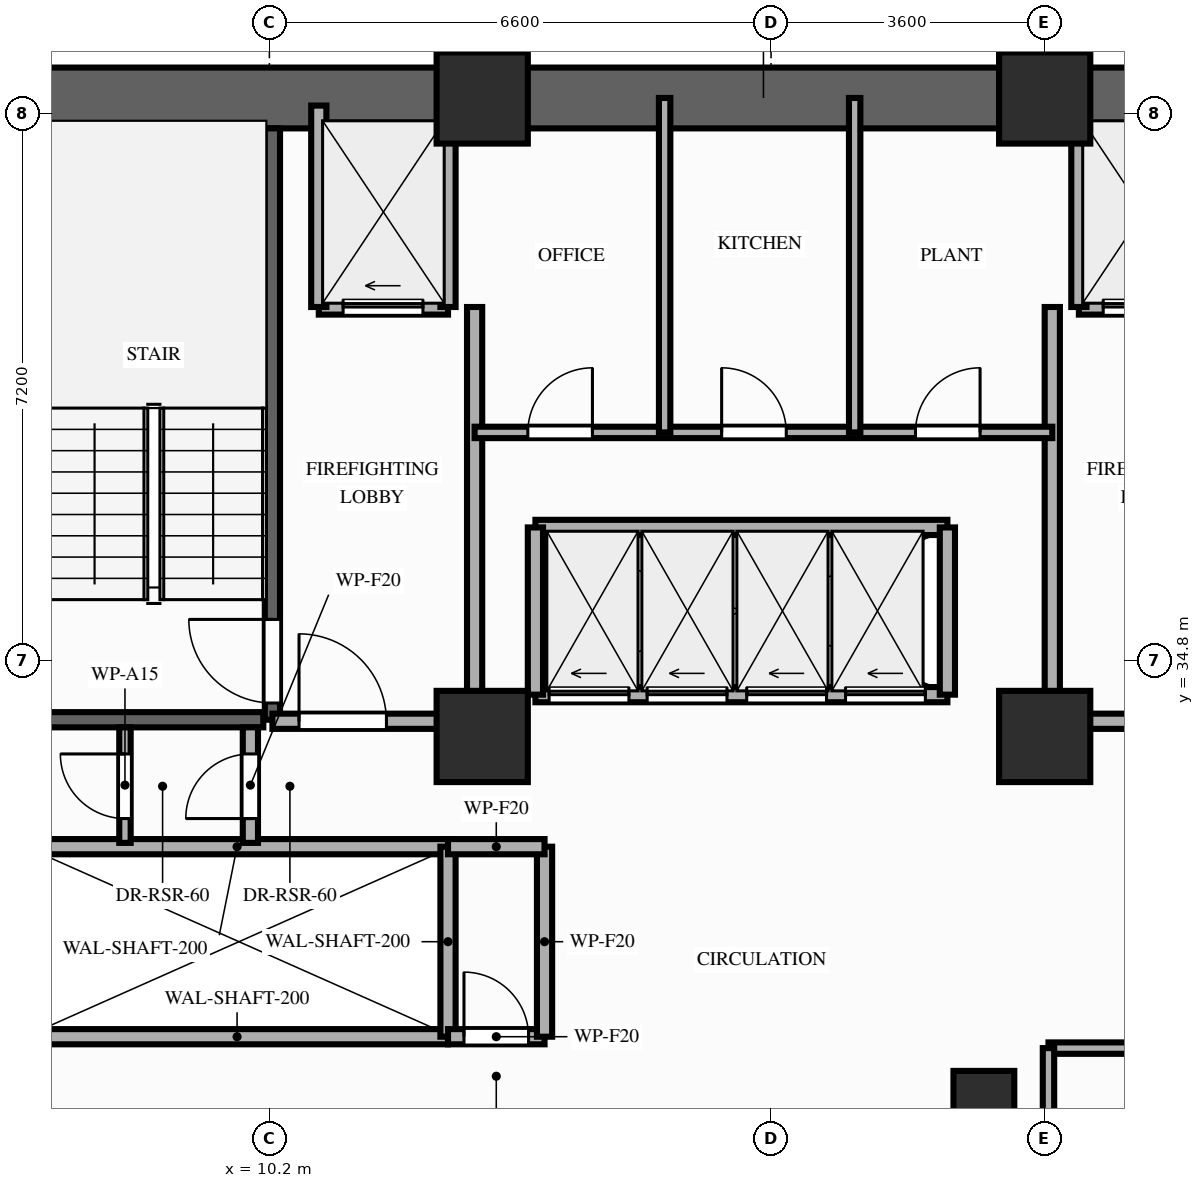
"""IFC4 building model, lengths in metres.
Left out: names, types, materials, properties, quantities, classifications, styles, units other than length and angle.
Written with IfcOpenShell. Run it as: python <this file> out.ifc"""

import sys

from ifc_helpers import new_model, si_unit, direction, frame, frame_2d, origin, origin_2d, place, context, subcontext, project, spatial, rectangle, extrude, element, fill, save


model = new_model("IFC4")
c1 = context("Model", 3, precision=1e-05, world=origin(), true_north=direction((0.0, 1.0)))
c2 = subcontext(c1, "Body", "Model", "MODEL_VIEW")
j1 = project(units=[si_unit("LENGTHUNIT", "METRE"), si_unit("PLANEANGLEUNIT", "RADIAN")], contexts=[c1])
p1 = place(None, origin())
s1 = spatial("IfcSite", under=j1, at=p1, CompositionType="ELEMENT")
p2 = place(p1, origin())
s2 = spatial("IfcBuilding", under=s1, at=p2, CompositionType="ELEMENT")
p3 = place(p2, frame((0.0, 0.0, 93.0)))
s3 = spatial("IfcBuildingStorey", under=s2, at=p3, CompositionType="ELEMENT", Elevation=93.0)
for number, where, z_axis, x_axis in (
    (1, (13.0, 33.8, 0.0), (0.0, 0.0, 1.0), (1.0, 0.0, 0.0)),
    (2, (20.4, 33.8, 0.0), (0.0, 0.0, 1.0), (1.0, 0.0, 0.0)),
    (3, (13.0, 42.2, 0.0), (0.0, 0.0, 1.0), (1.0, 0.0, 0.0)),
    (4, (20.4, 42.2, 0.0), (0.0, 0.0, 1.0), (1.0, 0.0, 0.0)),
):
    element("IfcColumn", number, at=place(p3, frame(where, z_axis=z_axis, x_axis=x_axis)), inside=s3, PredefinedType="COLUMN", context=c2, shape_type="SweptSolid", body=[
        extrude(rectangle(XDim=1.2, YDim=1.2, at=origin_2d()), origin(), (0.0, 0.0, 1.0), 3.2),
    ])
p4 = place(p3, frame((19.6, 28.8, 0.0), z_axis=(0.0, 0.0, 1.0), x_axis=(1.0, 0.0, 0.0)))
e5 = element("IfcColumn", 5, at=p4, inside=s3, PredefinedType="COLUMN", context=c2, shape_type="SweptSolid", body=[
    extrude(rectangle(XDim=0.8, YDim=1.2, at=origin_2d()), origin(), (0.0, 0.0, 1.0), 3.2),
])
p5 = place(p3, frame((6.45, 42.2, 0.0), z_axis=(0.0, 0.0, 1.0), x_axis=(1.0, 0.0, 0.0)))
e6 = element("IfcWall", 6, at=p5, inside=s3, PredefinedType="SHEAR", context=c2, shape_type="SweptSolid", body=[
    extrude(rectangle(XDim=20.45, YDim=0.8, at=frame_2d((10.225, 0.0))), origin(), (0.0, 0.0, 1.0), 3.02),
])
p6 = place(p3, frame((10.24, 34.02, 0.0), z_axis=(0.0, 0.0, 1.0), x_axis=(0.0, 1.0, 0.0)))
e7 = element("IfcWall", 7, at=p6, inside=s3, PredefinedType="SHEAR", context=c2, shape_type="SweptSolid", body=[
    extrude(rectangle(XDim=7.78, YDim=0.2, at=frame_2d((3.89, 0.0))), origin(), (0.0, 0.0, 1.0), 3.02),
])
p7 = place(p6, frame((0.22, 0.0, 0.0)))
e8 = element("IfcOpeningElement", 8, at=p7, cuts=e7, PredefinedType="OPENING", context=c2, shape_type="SweptSolid", body=[
    extrude(rectangle(XDim=1.1, YDim=2.15, at=frame_2d((0.55, 1.075))), frame((0.0, 0.11, 0.0), z_axis=(0.0, -1.0, 0.0), x_axis=(1.0, 0.0, 0.0)), (0.0, 0.0, 1.0), 0.22),
])
p8 = place(p3, frame((7.24, 34.02, 0.0), z_axis=(0.0, 0.0, 1.0), x_axis=(1.0, 0.0, 0.0)))
e9 = element("IfcWall", 9, at=p8, inside=s3, PredefinedType="SHEAR", context=c2, shape_type="SweptSolid", body=[
    extrude(rectangle(XDim=2.88, YDim=0.2, at=frame_2d((1.44, 0.0))), origin(), (0.0, 0.0, 1.0), 3.02),
])
for number, where, z_axis, x_axis in (
    (10, (7.0, 29.85, 0.0), (0.0, 0.0, 1.0), (1.0, 0.0, 0.0)),
    (11, (7.0, 32.35, 0.0), (0.0, 0.0, 1.0), (1.0, 0.0, 0.0)),
):
    element("IfcWall", number, at=place(p3, frame(where, z_axis=z_axis, x_axis=x_axis)), inside=s3, PredefinedType="MOVABLE", context=c2, shape_type="SweptSolid", body=[
        extrude(rectangle(XDim=5.55, YDim=0.2, at=frame_2d((2.775, 0.0))), origin(), (0.0, 0.0, 1.0), 3.02),
    ])
p9 = place(p3, frame((12.55, 29.85, 0.0), z_axis=(0.0, 0.0, 1.0), x_axis=(0.0, 1.0, 0.0)))
e12 = element("IfcWall", 12, at=p9, inside=s3, PredefinedType="MOVABLE", context=c2, shape_type="SweptSolid", body=[
    extrude(rectangle(XDim=2.5, YDim=0.2, at=frame_2d((1.25, 0.0))), origin(), (0.0, 0.0, 1.0), 3.02),
])
p10 = place(p3, frame((10.85, 39.45, 0.0), z_axis=(0.0, 0.0, 1.0), x_axis=(1.0, 0.0, 0.0)))
e13 = element("IfcWall", 13, at=p10, inside=s3, PredefinedType="MOVABLE", context=c2, shape_type="SweptSolid", body=[
    extrude(rectangle(XDim=1.7, YDim=0.2, at=frame_2d((0.85, 0.0))), origin(), (0.0, 0.0, 1.0), 3.02),
])
p11 = place(p10, frame((0.32, 0.0, 0.0)))
e14 = element("IfcOpeningElement", 14, at=p11, cuts=e13, PredefinedType="OPENING", context=c2, shape_type="SweptSolid", body=[
    extrude(rectangle(XDim=1.05, YDim=2.15, at=frame_2d((0.525, 1.075))), frame((0.0, 0.11, 0.0), z_axis=(0.0, -1.0, 0.0), x_axis=(1.0, 0.0, 0.0)), (0.0, 0.0, 1.0), 0.22),
])
p12 = place(p3, frame((20.85, 39.45, 0.0), z_axis=(0.0, 0.0, 1.0), x_axis=(1.0, 0.0, 0.0)))
e15 = element("IfcWall", 15, at=p12, inside=s3, PredefinedType="MOVABLE", context=c2, shape_type="SweptSolid", body=[
    extrude(rectangle(XDim=1.7, YDim=0.2, at=frame_2d((0.85, 0.0))), origin(), (0.0, 0.0, 1.0), 3.02),
])
p13 = place(p12, frame((0.32, 0.0, 0.0)))
e16 = element("IfcOpeningElement", 16, at=p13, cuts=e15, PredefinedType="OPENING", context=c2, shape_type="SweptSolid", body=[
    extrude(rectangle(XDim=1.05, YDim=2.15, at=frame_2d((0.525, 1.075))), frame((0.0, 0.11, 0.0), z_axis=(0.0, -1.0, 0.0), x_axis=(1.0, 0.0, 0.0)), (0.0, 0.0, 1.0), 0.22),
])
for number, where, z_axis, x_axis in (
    (17, (10.85, 39.45, 0.0), (0.0, 0.0, 1.0), (0.0, 1.0, 0.0)),
    (18, (12.55, 39.45, 0.0), (0.0, 0.0, 1.0), (0.0, 1.0, 0.0)),
):
    element("IfcWall", number, at=place(p3, frame(where, z_axis=z_axis, x_axis=x_axis)), inside=s3, PredefinedType="MOVABLE", context=c2, shape_type="SweptSolid", body=[
        extrude(rectangle(XDim=2.65, YDim=0.2, at=frame_2d((1.325, 0.0))), origin(), (0.0, 0.0, 1.0), 2.41),
    ])
p14 = place(p3, frame((12.9, 34.0, 0.0), z_axis=(0.0, 0.0, 1.0), x_axis=(0.0, 1.0, 0.0)))
e19 = element("IfcWall", 19, at=p14, inside=s3, PredefinedType="PARTITIONING", context=c2, shape_type="SweptSolid", body=[
    extrude(rectangle(XDim=5.45, YDim=0.2, at=frame_2d((2.725, 0.0))), origin(), (0.0, 0.0, 1.0), 2.41),
])
p15 = place(p3, frame((10.24, 34.0, 0.0), z_axis=(0.0, 0.0, 1.0), x_axis=(1.0, 0.0, 0.0)))
e20 = element("IfcWall", 20, at=p15, inside=s3, PredefinedType="PARTITIONING", context=c2, shape_type="SweptSolid", body=[
    extrude(rectangle(XDim=2.66, YDim=0.2, at=frame_2d((1.33, 0.0))), origin(), (0.0, 0.0, 1.0), 2.41),
])
p16 = place(p15, frame((0.35, 0.0, 0.0)))
e21 = element("IfcOpeningElement", 21, at=p16, cuts=e20, PredefinedType="OPENING", context=c2, shape_type="SweptSolid", body=[
    extrude(rectangle(XDim=1.15, YDim=2.15, at=frame_2d((0.575, 1.075))), frame((0.0, 0.11, 0.0), z_axis=(0.0, -1.0, 0.0), x_axis=(1.0, 0.0, 0.0)), (0.0, 0.0, 1.0), 0.22),
])
p17 = place(p3, frame((20.85, 39.45, 0.0), z_axis=(0.0, 0.0, 1.0), x_axis=(0.0, 1.0, 0.0)))
e22 = element("IfcWall", 22, at=p17, inside=s3, PredefinedType="MOVABLE", context=c2, shape_type="SweptSolid", body=[
    extrude(rectangle(XDim=2.65, YDim=0.2, at=frame_2d((1.325, 0.0))), origin(), (0.0, 0.0, 1.0), 2.41),
])
p18 = place(p3, frame((20.5, 34.0, 0.0), z_axis=(0.0, 0.0, 1.0), x_axis=(0.0, 1.0, 0.0)))
e23 = element("IfcWall", 23, at=p18, inside=s3, PredefinedType="PARTITIONING", context=c2, shape_type="SweptSolid", body=[
    extrude(rectangle(XDim=5.45, YDim=0.2, at=frame_2d((2.725, 0.0))), origin(), (0.0, 0.0, 1.0), 2.41),
])
p19 = place(p3, frame((20.5, 34.0, 0.0), z_axis=(0.0, 0.0, 1.0), x_axis=(1.0, 0.0, 0.0)))
e24 = element("IfcWall", 24, at=p19, inside=s3, PredefinedType="PARTITIONING", context=c2, shape_type="SweptSolid", body=[
    extrude(rectangle(XDim=2.6, YDim=0.2, at=frame_2d((1.3, 0.0))), origin(), (0.0, 0.0, 1.0), 2.41),
])
p20 = place(p19, frame((1.05, 0.0, 0.0)))
e25 = element("IfcOpeningElement", 25, at=p20, cuts=e24, PredefinedType="OPENING", context=c2, shape_type="SweptSolid", body=[
    extrude(rectangle(XDim=1.15, YDim=2.15, at=frame_2d((0.575, 1.075))), frame((0.0, 0.11, 0.0), z_axis=(0.0, -1.0, 0.0), x_axis=(1.0, 0.0, 0.0)), (0.0, 0.0, 1.0), 0.22),
])
p21 = place(p3, frame((9.95, 32.4, 0.0), z_axis=(0.0, 0.0, 1.0), x_axis=(0.0, 1.0, 0.0)))
e26 = element("IfcWall", 26, at=p21, inside=s3, PredefinedType="PARTITIONING", context=c2, shape_type="SweptSolid", body=[
    extrude(rectangle(XDim=1.52, YDim=0.2, at=frame_2d((0.76, 0.0))), origin(), (0.0, 0.0, 1.0), 2.41),
])
p22 = place(p21, frame((0.32, 0.0, 0.0)))
e27 = element("IfcOpeningElement", 27, at=p22, cuts=e26, PredefinedType="OPENING", context=c2, shape_type="SweptSolid", body=[
    extrude(rectangle(XDim=0.85, YDim=2.05, at=frame_2d((0.425, 1.025))), frame((0.0, 0.11, 0.0), z_axis=(0.0, -1.0, 0.0), x_axis=(1.0, 0.0, 0.0)), (0.0, 0.0, 1.0), 0.22),
])
p23 = place(p3, frame((8.3, 32.4, 0.0), z_axis=(0.0, 0.0, 1.0), x_axis=(0.0, 1.0, 0.0)))
e28 = element("IfcWall", 28, at=p23, inside=s3, PredefinedType="PARTITIONING", context=c2, shape_type="SweptSolid", body=[
    extrude(rectangle(XDim=1.52, YDim=0.15, at=frame_2d((0.76, 0.0))), origin(), (0.0, 0.0, 1.0), 2.41),
])
p24 = place(p23, frame((0.32, 0.0, 0.0)))
e29 = element("IfcOpeningElement", 29, at=p24, cuts=e28, PredefinedType="OPENING", context=c2, shape_type="SweptSolid", body=[
    extrude(rectangle(XDim=0.85, YDim=2.05, at=frame_2d((0.425, 1.025))), frame((0.0, 0.085, 0.0), z_axis=(0.0, -1.0, 0.0), x_axis=(1.0, 0.0, 0.0)), (0.0, 0.0, 1.0), 0.17),
])
p25 = place(p3, frame((12.55, 29.85, 0.0), z_axis=(0.0, 0.0, 1.0), x_axis=(1.0, 0.0, 0.0)))
e30 = element("IfcWall", 30, at=p25, inside=s3, PredefinedType="PARTITIONING", context=c2, shape_type="SweptSolid", body=[
    extrude(rectangle(XDim=1.27, YDim=0.2, at=frame_2d((0.635, 0.0))), origin(), (0.0, 0.0, 1.0), 3.02),
])
p26 = place(p25, frame((0.21, 0.0, 0.0)))
e31 = element("IfcOpeningElement", 31, at=p26, cuts=e30, PredefinedType="OPENING", context=c2, shape_type="SweptSolid", body=[
    extrude(rectangle(XDim=0.85, YDim=2.05, at=frame_2d((0.425, 1.025))), frame((0.0, 0.11, 0.0), z_axis=(0.0, -1.0, 0.0), x_axis=(1.0, 0.0, 0.0)), (0.0, 0.0, 1.0), 0.22),
])
p27 = place(p3, frame((13.82, 29.85, 0.0), z_axis=(0.0, 0.0, 1.0), x_axis=(0.0, 1.0, 0.0)))
e32 = element("IfcWall", 32, at=p27, inside=s3, PredefinedType="PARTITIONING", context=c2, shape_type="SweptSolid", body=[
    extrude(rectangle(XDim=2.5, YDim=0.2, at=frame_2d((1.25, 0.0))), origin(), (0.0, 0.0, 1.0), 3.02),
])
p28 = place(p3, frame((12.55, 32.35, 0.0), z_axis=(0.0, 0.0, 1.0), x_axis=(1.0, 0.0, 0.0)))
e33 = element("IfcWall", 33, at=p28, inside=s3, PredefinedType="PARTITIONING", context=c2, shape_type="SweptSolid", body=[
    extrude(rectangle(XDim=1.27, YDim=0.2, at=frame_2d((0.635, 0.0))), origin(), (0.0, 0.0, 1.0), 3.02),
])
p29 = place(p3, frame((12.9, 37.8, 0.0), z_axis=(0.0, 0.0, 1.0), x_axis=(1.0, 0.0, 0.0)))
e34 = element("IfcWall", 34, at=p29, inside=s3, PredefinedType="PARTITIONING", context=c2, shape_type="SweptSolid", body=[
    extrude(rectangle(XDim=7.6, YDim=0.15, at=frame_2d((3.8, 0.0))), origin(), (0.0, 0.0, 1.0), 3.02),
])
p30 = place(p29, frame((0.7, 0.0, 0.0)))
e35 = element("IfcOpeningElement", 35, at=p30, cuts=e34, PredefinedType="OPENING", context=c2, shape_type="SweptSolid", body=[
    extrude(rectangle(XDim=0.85, YDim=2.05, at=frame_2d((0.425, 1.025))), frame((0.0, 0.085, 0.0), z_axis=(0.0, -1.0, 0.0), x_axis=(1.0, 0.0, 0.0)), (0.0, 0.0, 1.0), 0.17),
])
p31 = place(p29, frame((3.25, 0.0, 0.0)))
e36 = element("IfcOpeningElement", 36, at=p31, cuts=e34, PredefinedType="OPENING", context=c2, shape_type="SweptSolid", body=[
    extrude(rectangle(XDim=0.85, YDim=2.05, at=frame_2d((0.425, 1.025))), frame((0.0, 0.085, 0.0), z_axis=(0.0, -1.0, 0.0), x_axis=(1.0, 0.0, 0.0)), (0.0, 0.0, 1.0), 0.17),
])
p32 = place(p29, frame((5.8, 0.0, 0.0)))
e37 = element("IfcOpeningElement", 37, at=p32, cuts=e34, PredefinedType="OPENING", context=c2, shape_type="SweptSolid", body=[
    extrude(rectangle(XDim=0.85, YDim=2.05, at=frame_2d((0.425, 1.025))), frame((0.0, 0.085, 0.0), z_axis=(0.0, -1.0, 0.0), x_axis=(1.0, 0.0, 0.0)), (0.0, 0.0, 1.0), 0.17),
])
for number, where, z_axis, x_axis in (
    (38, (15.4, 37.8, 0.0), (0.0, 0.0, 1.0), (0.0, 1.0, 0.0)),
    (39, (17.9, 37.8, 0.0), (0.0, 0.0, 1.0), (0.0, 1.0, 0.0)),
):
    element("IfcWall", number, at=place(p3, frame(where, z_axis=z_axis, x_axis=x_axis)), inside=s3, PredefinedType="PARTITIONING", context=c2, shape_type="SweptSolid", body=[
        extrude(rectangle(XDim=4.4, YDim=0.15, at=frame_2d((2.2, 0.0))), origin(), (0.0, 0.0, 1.0), 2.41),
    ])
p33 = place(p3, frame((13.7, 34.35, 0.0), z_axis=(0.0, 0.0, 1.0), x_axis=(1.0, 0.0, 0.0)))
e40 = element("IfcWall", 40, at=p33, inside=s3, PredefinedType="MOVABLE", context=c2, shape_type="SweptSolid", body=[
    extrude(rectangle(XDim=5.42, YDim=0.2, at=frame_2d((2.71, 0.0))), origin(), (0.0, 0.0, 1.0), 3.02),
])
p34 = place(p33, frame((0.18, 0.0, 0.0)))
e41 = element("IfcOpeningElement", 41, at=p34, cuts=e40, PredefinedType="OPENING", context=c2, shape_type="SweptSolid", body=[
    extrude(rectangle(XDim=1.05, YDim=2.15, at=frame_2d((0.525, 1.075))), frame((0.0, 0.11, 0.0), z_axis=(0.0, -1.0, 0.0), x_axis=(1.0, 0.0, 0.0)), (0.0, 0.0, 1.0), 0.22),
])
p35 = place(p33, frame((1.47, 0.0, 0.0)))
e42 = element("IfcOpeningElement", 42, at=p35, cuts=e40, PredefinedType="OPENING", context=c2, shape_type="SweptSolid", body=[
    extrude(rectangle(XDim=1.05, YDim=2.15, at=frame_2d((0.525, 1.075))), frame((0.0, 0.11, 0.0), z_axis=(0.0, -1.0, 0.0), x_axis=(1.0, 0.0, 0.0)), (0.0, 0.0, 1.0), 0.22),
])
p36 = place(p33, frame((2.78, 0.0, 0.0)))
e43 = element("IfcOpeningElement", 43, at=p36, cuts=e40, PredefinedType="OPENING", context=c2, shape_type="SweptSolid", body=[
    extrude(rectangle(XDim=1.05, YDim=2.15, at=frame_2d((0.525, 1.075))), frame((0.0, 0.11, 0.0), z_axis=(0.0, -1.0, 0.0), x_axis=(1.0, 0.0, 0.0)), (0.0, 0.0, 1.0), 0.22),
])
p37 = place(p33, frame((4.08, 0.0, 0.0)))
e44 = element("IfcOpeningElement", 44, at=p37, cuts=e40, PredefinedType="OPENING", context=c2, shape_type="SweptSolid", body=[
    extrude(rectangle(XDim=1.05, YDim=2.15, at=frame_2d((0.525, 1.075))), frame((0.0, 0.11, 0.0), z_axis=(0.0, -1.0, 0.0), x_axis=(1.0, 0.0, 0.0)), (0.0, 0.0, 1.0), 0.22),
])
p38 = place(p3, frame((13.7, 36.55, 0.0), z_axis=(0.0, 0.0, 1.0), x_axis=(1.0, 0.0, 0.0)))
e45 = element("IfcWall", 45, at=p38, inside=s3, PredefinedType="MOVABLE", context=c2, shape_type="SweptSolid", body=[
    extrude(rectangle(XDim=5.42, YDim=0.2, at=frame_2d((2.71, 0.0))), origin(), (0.0, 0.0, 1.0), 3.02),
])
for number, where, z_axis, x_axis in (
    (46, (13.7, 34.35, 0.0), (0.0, 0.0, 1.0), (0.0, 1.0, 0.0)),
    (47, (19.12, 34.35, 0.0), (0.0, 0.0, 1.0), (0.0, 1.0, 0.0)),
):
    element("IfcWall", number, at=place(p3, frame(where, z_axis=z_axis, x_axis=x_axis)), inside=s3, PredefinedType="MOVABLE", context=c2, shape_type="SweptSolid", body=[
        extrude(rectangle(XDim=2.2, YDim=0.2, at=frame_2d((1.1, 0.0))), origin(), (0.0, 0.0, 1.0), 3.02),
    ])
p39 = place(p3, frame((20.45, 29.7, 0.0), z_axis=(0.0, 0.0, 1.0), x_axis=(1.0, 0.0, 0.0)))
e48 = element("IfcWall", 48, at=p39, inside=s3, PredefinedType="PARTITIONING", context=c2, shape_type="SweptSolid", body=[
    extrude(rectangle(XDim=6.7, YDim=0.15, at=frame_2d((3.35, 0.0))), origin(), (0.0, 0.0, 1.0), 3.02),
])
p40 = place(p39, frame((2.8, 0.0, 0.0)))
e49 = element("IfcOpeningElement", 49, at=p40, cuts=e48, PredefinedType="OPENING", context=c2, shape_type="SweptSolid", body=[
    extrude(rectangle(XDim=0.95, YDim=2.15, at=frame_2d((0.475, 1.075))), frame((0.0, 0.085, 0.0), z_axis=(0.0, -1.0, 0.0), x_axis=(1.0, 0.0, 0.0)), (0.0, 0.0, 1.0), 0.17),
])
p41 = place(p3, frame((20.45, 26.75, 0.0), z_axis=(0.0, 0.0, 1.0), x_axis=(0.0, 1.0, 0.0)))
e50 = element("IfcWall", 50, at=p41, inside=s3, PredefinedType="PARTITIONING", context=c2, shape_type="SweptSolid", body=[
    extrude(rectangle(XDim=2.95, YDim=0.15, at=frame_2d((1.475, 0.0))), origin(), (0.0, 0.0, 1.0), 2.41),
])
p42 = place(p7, origin())
e51 = element("IfcDoor", 51, at=p42, inside=s3, OperationType="SINGLE_SWING_RIGHT", PredefinedType="DOOR", context=c2, shape_type="SweptSolid", body=[
    extrude(rectangle(XDim=1.1, YDim=2.15, at=frame_2d((0.55, 1.075))), frame((0.0, 0.025, 0.0), z_axis=(0.0, -1.0, 0.0), x_axis=(1.0, 0.0, 0.0)), (0.0, 0.0, 1.0), 0.05),
])
fill(e8, e51)
p43 = place(p11, origin())
e52 = element("IfcDoor", 52, at=p43, inside=s3, OperationType="SLIDING_TO_LEFT", PredefinedType="DOOR", context=c2, shape_type="SweptSolid", body=[
    extrude(rectangle(XDim=1.05, YDim=2.15, at=frame_2d((0.525, 1.075))), frame((0.0, 0.025, 0.0), z_axis=(0.0, -1.0, 0.0), x_axis=(1.0, 0.0, 0.0)), (0.0, 0.0, 1.0), 0.05),
])
fill(e14, e52)
p44 = place(p13, origin())
e53 = element("IfcDoor", 53, at=p44, inside=s3, OperationType="SLIDING_TO_LEFT", PredefinedType="DOOR", context=c2, shape_type="SweptSolid", body=[
    extrude(rectangle(XDim=1.05, YDim=2.15, at=frame_2d((0.525, 1.075))), frame((0.0, 0.025, 0.0), z_axis=(0.0, -1.0, 0.0), x_axis=(1.0, 0.0, 0.0)), (0.0, 0.0, 1.0), 0.05),
])
fill(e16, e53)
p45 = place(p16, origin())
e54 = element("IfcDoor", 54, at=p45, inside=s3, OperationType="SINGLE_SWING_LEFT", PredefinedType="DOOR", context=c2, shape_type="SweptSolid", body=[
    extrude(rectangle(XDim=1.15, YDim=2.15, at=frame_2d((0.575, 1.075))), frame((0.0, 0.025, 0.0), z_axis=(0.0, -1.0, 0.0), x_axis=(1.0, 0.0, 0.0)), (0.0, 0.0, 1.0), 0.05),
])
fill(e21, e54)
p46 = place(p22, origin())
e55 = element("IfcDoor", 55, at=p46, inside=s3, OperationType="SINGLE_SWING_LEFT", PredefinedType="DOOR", context=c2, shape_type="SweptSolid", body=[
    extrude(rectangle(XDim=0.85, YDim=2.05, at=frame_2d((0.425, 1.025))), frame((0.0, 0.025, 0.0), z_axis=(0.0, -1.0, 0.0), x_axis=(1.0, 0.0, 0.0)), (0.0, 0.0, 1.0), 0.05),
])
fill(e27, e55)
p47 = place(p24, origin())
e56 = element("IfcDoor", 56, at=p47, inside=s3, OperationType="SINGLE_SWING_RIGHT", PredefinedType="DOOR", context=c2, shape_type="SweptSolid", body=[
    extrude(rectangle(XDim=0.85, YDim=2.05, at=frame_2d((0.425, 1.025))), frame((0.0, 0.025, 0.0), z_axis=(0.0, -1.0, 0.0), x_axis=(1.0, 0.0, 0.0)), (0.0, 0.0, 1.0), 0.05),
])
fill(e29, e56)
p48 = place(p26, origin())
e57 = element("IfcDoor", 57, at=p48, inside=s3, OperationType="SINGLE_SWING_LEFT", PredefinedType="DOOR", context=c2, shape_type="SweptSolid", body=[
    extrude(rectangle(XDim=0.85, YDim=2.05, at=frame_2d((0.425, 1.025))), frame((0.0, 0.025, 0.0), z_axis=(0.0, -1.0, 0.0), x_axis=(1.0, 0.0, 0.0)), (0.0, 0.0, 1.0), 0.05),
])
fill(e31, e57)
p49 = place(p30, origin())
e58 = element("IfcDoor", 58, at=p49, inside=s3, OperationType="SINGLE_SWING_RIGHT", PredefinedType="DOOR", context=c2, shape_type="SweptSolid", body=[
    extrude(rectangle(XDim=0.85, YDim=2.05, at=frame_2d((0.425, 1.025))), frame((0.0, 0.025, 0.0), z_axis=(0.0, -1.0, 0.0), x_axis=(1.0, 0.0, 0.0)), (0.0, 0.0, 1.0), 0.05),
])
fill(e35, e58)
p50 = place(p31, origin())
e59 = element("IfcDoor", 59, at=p50, inside=s3, OperationType="SINGLE_SWING_LEFT", PredefinedType="DOOR", context=c2, shape_type="SweptSolid", body=[
    extrude(rectangle(XDim=0.85, YDim=2.05, at=frame_2d((0.425, 1.025))), frame((0.0, 0.025, 0.0), z_axis=(0.0, -1.0, 0.0), x_axis=(1.0, 0.0, 0.0)), (0.0, 0.0, 1.0), 0.05),
])
fill(e36, e59)
p51 = place(p32, origin())
e60 = element("IfcDoor", 60, at=p51, inside=s3, OperationType="SINGLE_SWING_RIGHT", PredefinedType="DOOR", context=c2, shape_type="SweptSolid", body=[
    extrude(rectangle(XDim=0.85, YDim=2.05, at=frame_2d((0.425, 1.025))), frame((0.0, 0.025, 0.0), z_axis=(0.0, -1.0, 0.0), x_axis=(1.0, 0.0, 0.0)), (0.0, 0.0, 1.0), 0.05),
])
fill(e37, e60)
p52 = place(p34, origin())
e61 = element("IfcDoor", 61, at=p52, inside=s3, OperationType="SLIDING_TO_LEFT", PredefinedType="DOOR", context=c2, shape_type="SweptSolid", body=[
    extrude(rectangle(XDim=1.05, YDim=2.15, at=frame_2d((0.525, 1.075))), frame((0.0, 0.025, 0.0), z_axis=(0.0, -1.0, 0.0), x_axis=(1.0, 0.0, 0.0)), (0.0, 0.0, 1.0), 0.05),
])
fill(e41, e61)
p53 = place(p35, origin())
e62 = element("IfcDoor", 62, at=p53, inside=s3, OperationType="SLIDING_TO_LEFT", PredefinedType="DOOR", context=c2, shape_type="SweptSolid", body=[
    extrude(rectangle(XDim=1.05, YDim=2.15, at=frame_2d((0.525, 1.075))), frame((0.0, 0.025, 0.0), z_axis=(0.0, -1.0, 0.0), x_axis=(1.0, 0.0, 0.0)), (0.0, 0.0, 1.0), 0.05),
])
fill(e42, e62)
p54 = place(p36, origin())
e63 = element("IfcDoor", 63, at=p54, inside=s3, OperationType="SLIDING_TO_LEFT", PredefinedType="DOOR", context=c2, shape_type="SweptSolid", body=[
    extrude(rectangle(XDim=1.05, YDim=2.15, at=frame_2d((0.525, 1.075))), frame((0.0, 0.025, 0.0), z_axis=(0.0, -1.0, 0.0), x_axis=(1.0, 0.0, 0.0)), (0.0, 0.0, 1.0), 0.05),
])
fill(e43, e63)
p55 = place(p37, origin())
e64 = element("IfcDoor", 64, at=p55, inside=s3, OperationType="SLIDING_TO_LEFT", PredefinedType="DOOR", context=c2, shape_type="SweptSolid", body=[
    extrude(rectangle(XDim=1.05, YDim=2.15, at=frame_2d((0.525, 1.075))), frame((0.0, 0.025, 0.0), z_axis=(0.0, -1.0, 0.0), x_axis=(1.0, 0.0, 0.0)), (0.0, 0.0, 1.0), 0.05),
])
fill(e44, e64)
save(model, sys.argv[1])
